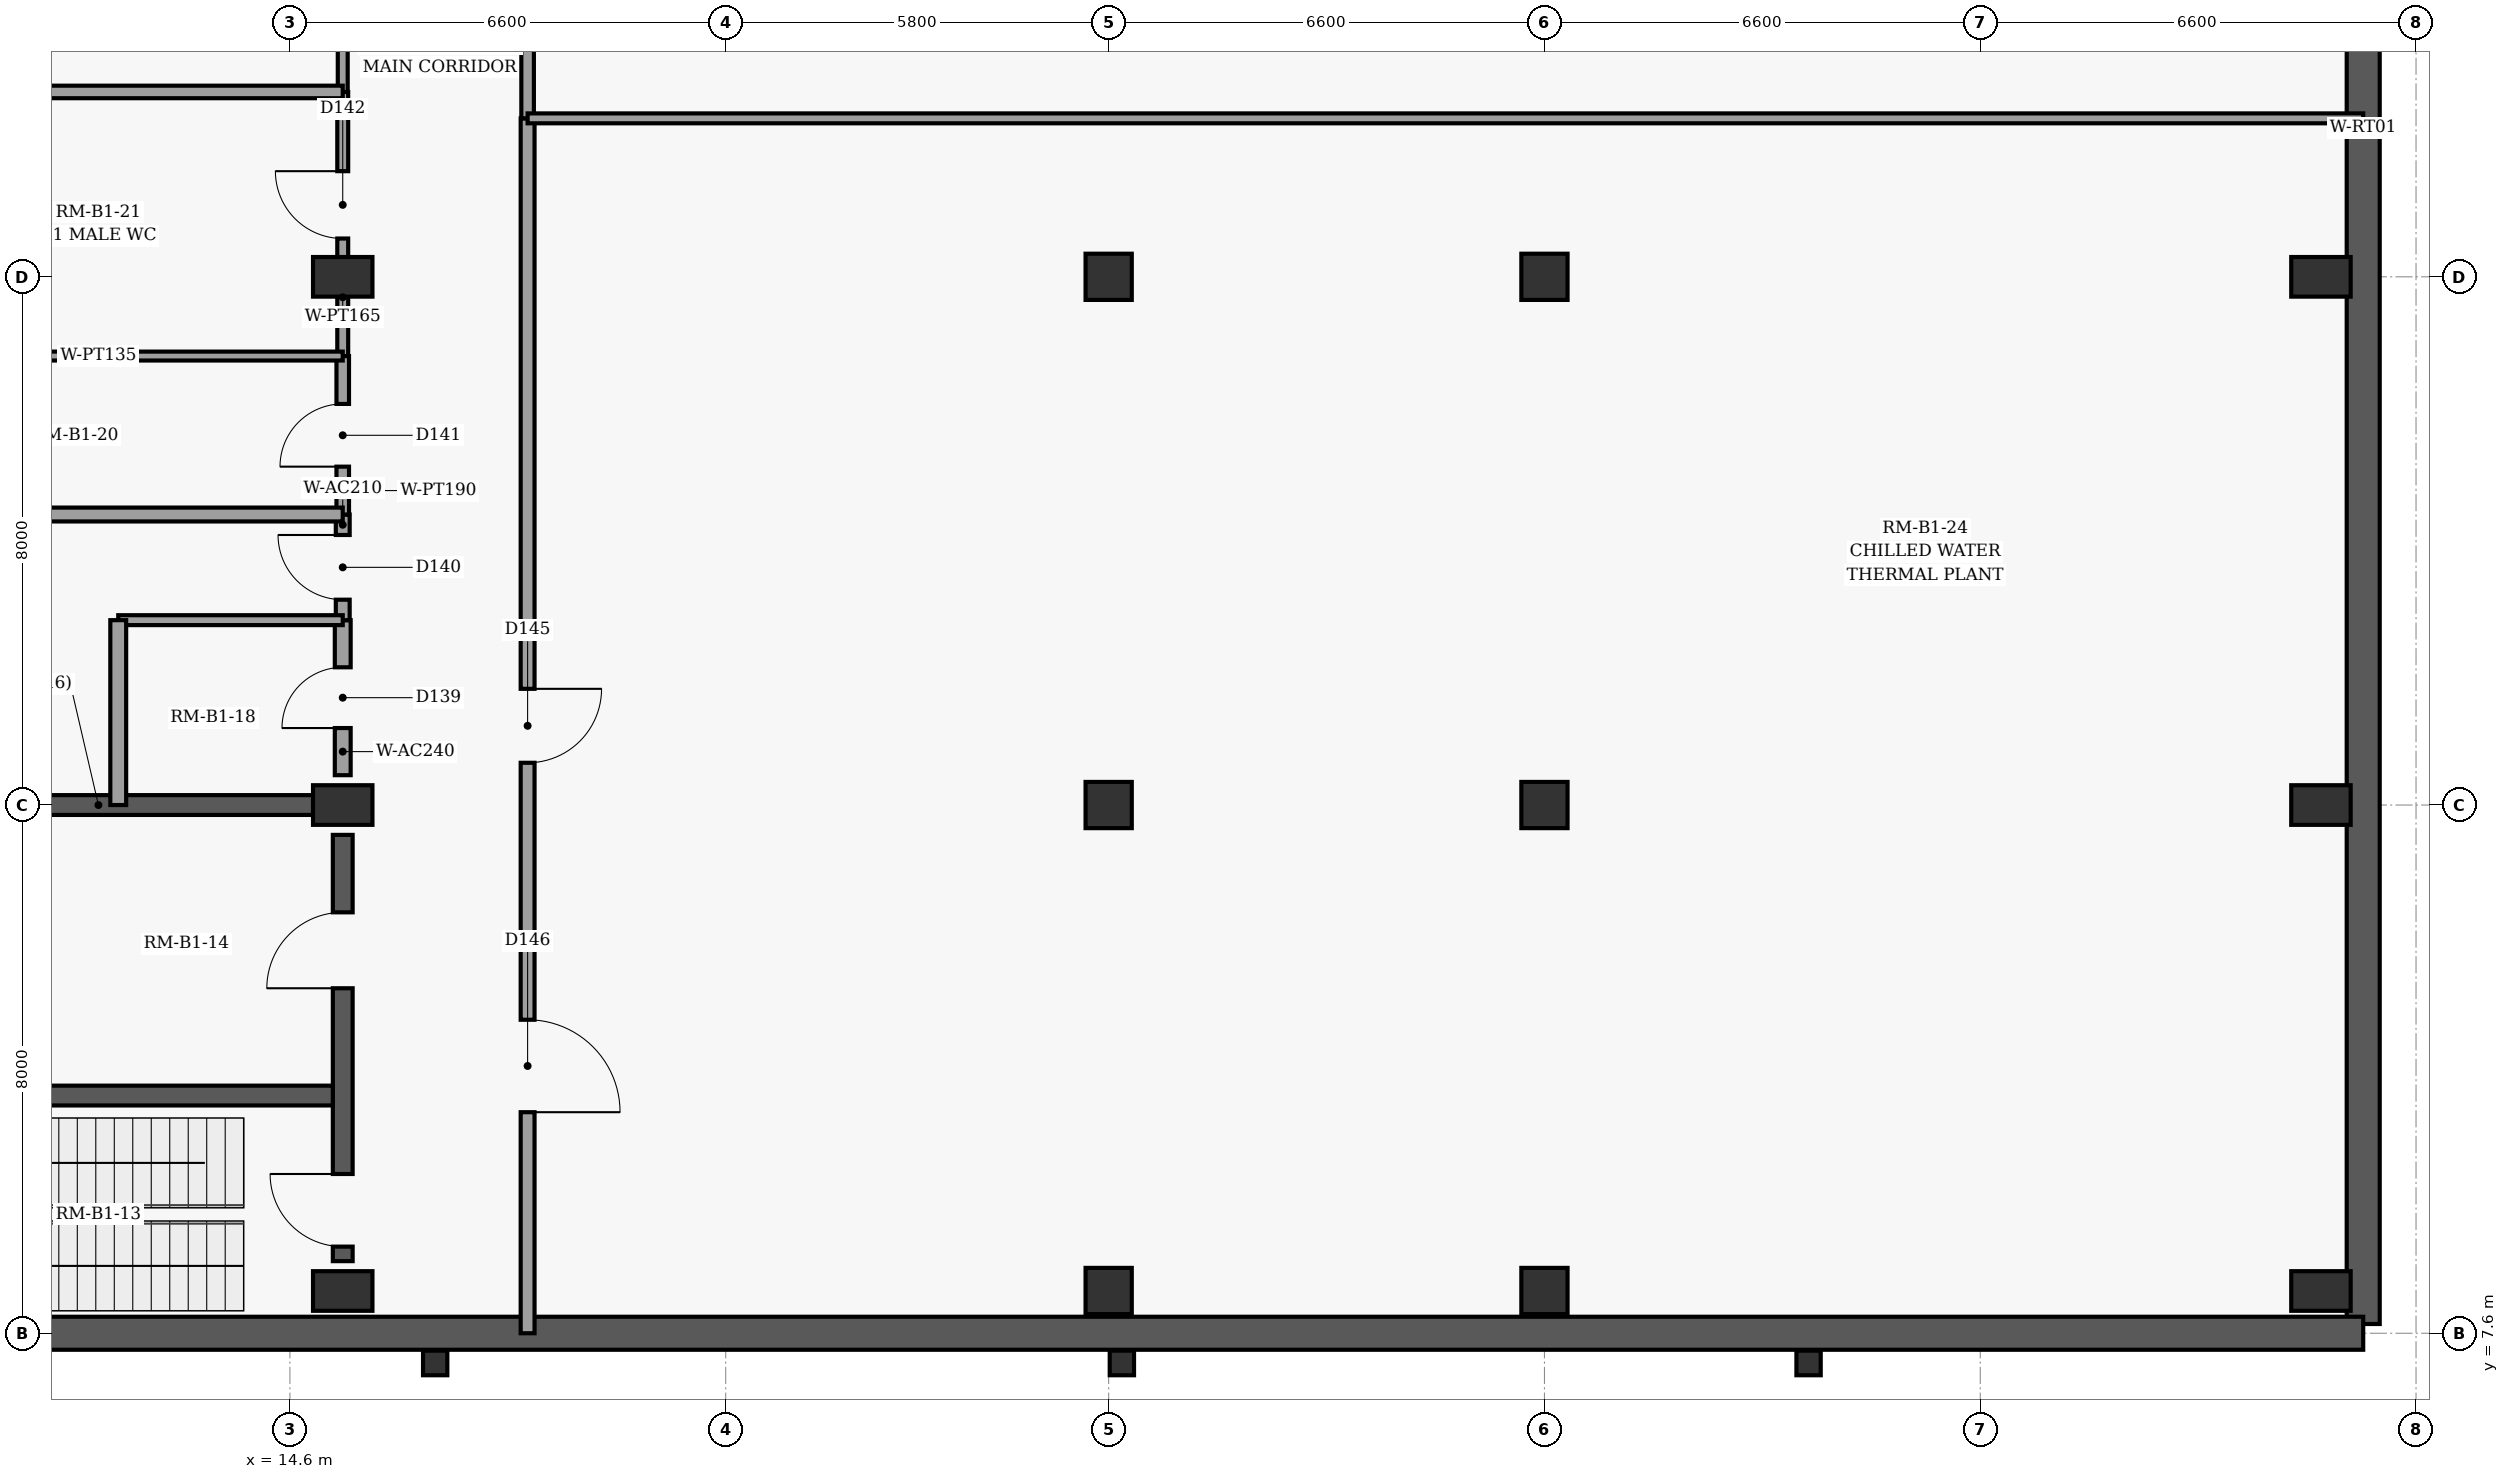
"""IFC4 building model, lengths in metres.
Left out: names, types, materials, properties, quantities, classifications, styles, units other than length and angle.
Written with IfcOpenShell. Run it as: python <this file> out.ifc"""

import sys

from ifc_helpers import new_model, si_unit, direction, frame, frame_2d, origin, origin_2d, place, context, subcontext, project, spatial, rectangle, i_section, extrude, element, fill, save


model = new_model("IFC4")
c1 = context("Model", 3, precision=1e-05, world=origin(), true_north=direction((0.0, 1.0)))
c2 = subcontext(c1, "Body", "Model", "MODEL_VIEW")
j1 = project(units=[si_unit("LENGTHUNIT", "METRE"), si_unit("PLANEANGLEUNIT", "RADIAN")], contexts=[c1])
p1 = place(None, origin())
s1 = spatial("IfcSite", under=j1, at=p1, CompositionType="ELEMENT")
p2 = place(p1, origin())
s2 = spatial("IfcBuilding", under=s1, at=p2, CompositionType="ELEMENT")
p3 = place(p2, frame((0.0, 0.0, -4.8)))
s3 = spatial("IfcBuildingStorey", under=s2, at=p3, CompositionType="ELEMENT", Elevation=-4.8)
for number, where, z_axis, x_axis in (
    (1, (15.4, 8.24, 0.0), (0.0, 0.0, 1.0), (1.0, 0.0, 0.0)),
    (2, (15.4, 15.6, 0.0), (0.0, 0.0, 1.0), (1.0, 0.0, 0.0)),
    (3, (15.4, 23.6, 0.0), (0.0, 0.0, 1.0), (1.0, 0.0, 0.0)),
):
    element("IfcColumn", number, at=place(p3, frame(where, z_axis=z_axis, x_axis=x_axis)), inside=s3, PredefinedType="COLUMN", context=c2, shape_type="SweptSolid", body=[
        extrude(rectangle(XDim=0.6, YDim=0.9, at=origin_2d()), origin(), (0.0, 0.0, 1.0), 4.8),
    ])
for number, where, z_axis, x_axis in (
    (4, (27.0, 8.24, 0.0), (0.0, 0.0, 1.0), (1.0, 0.0, 0.0)),
    (5, (27.0, 15.6, 0.0), (0.0, 0.0, 1.0), (1.0, 0.0, 0.0)),
    (6, (27.0, 23.6, 0.0), (0.0, 0.0, 1.0), (1.0, 0.0, 0.0)),
    (7, (33.6, 8.24, 0.0), (0.0, 0.0, 1.0), (1.0, 0.0, 0.0)),
    (8, (33.6, 15.6, 0.0), (0.0, 0.0, 1.0), (1.0, 0.0, 0.0)),
    (9, (33.6, 23.6, 0.0), (0.0, 0.0, 1.0), (1.0, 0.0, 0.0)),
):
    element("IfcColumn", number, at=place(p3, frame(where, z_axis=z_axis, x_axis=x_axis)), inside=s3, PredefinedType="COLUMN", context=c2, shape_type="SweptSolid", body=[
        extrude(rectangle(XDim=0.7, YDim=0.7, at=origin_2d()), origin(), (0.0, 0.0, 1.0), 4.8),
    ])
for number, where, z_axis, x_axis in (
    (10, (45.36, 8.24, 0.0), (0.0, 0.0, 1.0), (1.0, 0.0, 0.0)),
    (11, (45.36, 15.6, 0.0), (0.0, 0.0, 1.0), (1.0, 0.0, 0.0)),
    (12, (45.36, 23.6, 0.0), (0.0, 0.0, 1.0), (1.0, 0.0, 0.0)),
):
    element("IfcColumn", number, at=place(p3, frame(where, z_axis=z_axis, x_axis=x_axis)), inside=s3, PredefinedType="COLUMN", context=c2, shape_type="SweptSolid", body=[
        extrude(rectangle(XDim=0.6, YDim=0.9, at=origin_2d()), origin(), (0.0, 0.0, 1.0), 4.8),
    ])
for number, where, z_axis, x_axis in (
    (13, (16.8, 7.15, -0.45), (0.0, 0.0, 1.0), (1.0, 0.0, 0.0)),
    (14, (27.2, 7.15, -0.45), (0.0, 0.0, 1.0), (1.0, 0.0, 0.0)),
    (15, (37.6, 7.15, -0.45), (0.0, 0.0, 1.0), (1.0, 0.0, 0.0)),
):
    element("IfcColumn", number, at=place(p3, frame(where, z_axis=z_axis, x_axis=x_axis)), inside=s3, PredefinedType="COLUMN", context=c2, shape_type="SweptSolid", body=[
        extrude(i_section(OverallWidth=0.373, OverallDepth=0.368, WebThickness=0.014, FlangeThickness=0.024, at=origin_2d()), origin(), (0.0, 0.0, 1.0), 5.25),
    ])
p4 = place(p3, frame((46.0, 63.46, 0.0), z_axis=(0.0, 0.0, 1.0), x_axis=(0.0, -1.0, 0.0)))
e16 = element("IfcWall", 16, at=p4, inside=s3, PredefinedType="USERDEFINED", context=c2, shape_type="SweptSolid", body=[
    extrude(rectangle(XDim=55.72, YDim=0.5, at=frame_2d((27.86, 0.0))), origin(), (0.0, 0.0, 1.0), 4.5),
])
p5 = place(p3, frame((46.0, 7.6, 0.0), z_axis=(0.0, 0.0, 1.0), x_axis=(-1.0, 0.0, 0.0)))
e17 = element("IfcWall", 17, at=p5, inside=s3, PredefinedType="USERDEFINED", context=c2, shape_type="SweptSolid", body=[
    extrude(rectangle(XDim=38.0, YDim=0.5, at=frame_2d((19.0, 0.0))), origin(), (0.0, 0.0, 1.0), 4.5),
])
p6 = place(p3, frame((7.85, 15.6, 0.0), z_axis=(0.0, 0.0, 1.0), x_axis=(1.0, 0.0, 0.0)))
e18 = element("IfcWall", 18, at=p6, inside=s3, PredefinedType="SHEAR", context=c2, shape_type="SweptSolid", body=[
    extrude(rectangle(XDim=7.248, YDim=0.3, at=frame_2d((3.624, 0.0))), origin(), (0.0, 0.0, 1.0), 4.5),
])
p7 = place(p3, frame((15.4, 8.692, 0.0), z_axis=(0.0, 0.0, 1.0), x_axis=(0.0, 1.0, 0.0)))
e19 = element("IfcWall", 19, at=p7, inside=s3, PredefinedType="SHEAR", context=c2, shape_type="SweptSolid", body=[
    extrude(rectangle(XDim=6.456, YDim=0.3, at=frame_2d((3.228, 0.0))), origin(), (0.0, 0.0, 1.0), 4.5),
])
p8 = place(p7, frame((0.22, 0.0, 0.0)))
e20 = element("IfcOpeningElement", 20, at=p8, cuts=e19, PredefinedType="OPENING", context=c2, shape_type="SweptSolid", body=[
    extrude(rectangle(XDim=1.1, YDim=2.15, at=frame_2d((0.55, 1.075))), frame((0.0, 0.16, 0.0), z_axis=(0.0, -1.0, 0.0), x_axis=(1.0, 0.0, 0.0)), (0.0, 0.0, 1.0), 0.32),
])
p9 = place(p7, frame((4.133, 0.0, 0.0)))
e21 = element("IfcOpeningElement", 21, at=p9, cuts=e19, PredefinedType="OPENING", context=c2, shape_type="SweptSolid", body=[
    extrude(rectangle(XDim=1.15, YDim=2.2, at=frame_2d((0.575, 1.1))), frame((0.0, 0.16, 0.0), z_axis=(0.0, -1.0, 0.0), x_axis=(1.0, 0.0, 0.0)), (0.0, 0.0, 1.0), 0.32),
])
p10 = place(p3, frame((8.15, 11.2, 0.0), z_axis=(0.0, 0.0, 1.0), x_axis=(1.0, 0.0, 0.0)))
e22 = element("IfcWall", 22, at=p10, inside=s3, PredefinedType="SHEAR", context=c2, shape_type="SweptSolid", body=[
    extrude(rectangle(XDim=7.1, YDim=0.3, at=frame_2d((3.55, 0.0))), origin(), (0.0, 0.0, 1.0), 4.5),
])
p11 = place(p3, frame((15.4, 16.052, 0.0), z_axis=(0.0, 0.0, 1.0), x_axis=(0.0, 1.0, 0.0)))
e23 = element("IfcWall", 23, at=p11, inside=s3, PredefinedType="PARTITIONING", context=c2, shape_type="SweptSolid", body=[
    extrude(rectangle(XDim=2.348, YDim=0.24, at=frame_2d((1.174, 0.0))), origin(), (0.0, 0.0, 1.0), 3.65),
])
p12 = place(p11, frame((0.714, 0.0, 0.0)))
e24 = element("IfcOpeningElement", 24, at=p12, cuts=e23, PredefinedType="OPENING", context=c2, shape_type="SweptSolid", body=[
    extrude(rectangle(XDim=0.92, YDim=2.1, at=frame_2d((0.46, 1.05))), frame((0.0, 0.13, 0.0), z_axis=(0.0, -1.0, 0.0), x_axis=(1.0, 0.0, 0.0)), (0.0, 0.0, 1.0), 0.26),
])
p13 = place(p3, frame((15.4, 18.4, 0.0), z_axis=(0.0, 0.0, 1.0), x_axis=(0.0, 1.0, 0.0)))
e25 = element("IfcWall", 25, at=p13, inside=s3, PredefinedType="PARTITIONING", context=c2, shape_type="SweptSolid", body=[
    extrude(rectangle(XDim=1.6, YDim=0.21, at=frame_2d((0.8, 0.0))), origin(), (0.0, 0.0, 1.0), 3.65),
])
p14 = place(p13, frame((0.31, 0.0, 0.0)))
e26 = element("IfcOpeningElement", 26, at=p14, cuts=e25, PredefinedType="OPENING", context=c2, shape_type="SweptSolid", body=[
    extrude(rectangle(XDim=0.98, YDim=2.1, at=frame_2d((0.49, 1.05))), frame((0.0, 0.115, 0.0), z_axis=(0.0, -1.0, 0.0), x_axis=(1.0, 0.0, 0.0)), (0.0, 0.0, 1.0), 0.23),
])
p15 = place(p3, frame((15.4, 20.0, 0.0), z_axis=(0.0, 0.0, 1.0), x_axis=(0.0, 1.0, 0.0)))
e27 = element("IfcWall", 27, at=p15, inside=s3, PredefinedType="PARTITIONING", context=c2, shape_type="SweptSolid", body=[
    extrude(rectangle(XDim=2.4, YDim=0.19, at=frame_2d((1.2, 0.0))), origin(), (0.0, 0.0, 1.0), 3.65),
])
p16 = place(p15, frame((0.725, 0.0, 0.0)))
e28 = element("IfcOpeningElement", 28, at=p16, cuts=e27, PredefinedType="OPENING", context=c2, shape_type="SweptSolid", body=[
    extrude(rectangle(XDim=0.95, YDim=2.1, at=frame_2d((0.475, 1.05))), frame((0.0, 0.105, 0.0), z_axis=(0.0, -1.0, 0.0), x_axis=(1.0, 0.0, 0.0)), (0.0, 0.0, 1.0), 0.21),
])
p17 = place(p3, frame((15.4, 22.4, 0.0), z_axis=(0.0, 0.0, 1.0), x_axis=(0.0, 1.0, 0.0)))
e29 = element("IfcWall", 29, at=p17, inside=s3, PredefinedType="PARTITIONING", context=c2, shape_type="SweptSolid", body=[
    extrude(rectangle(XDim=4.0, YDim=0.165, at=frame_2d((2.0, 0.0))), origin(), (0.0, 0.0, 1.0), 3.65),
])
p18 = place(p17, frame((1.78, 0.0, 0.0)))
e30 = element("IfcOpeningElement", 30, at=p18, cuts=e29, PredefinedType="OPENING", context=c2, shape_type="SweptSolid", body=[
    extrude(rectangle(XDim=1.02, YDim=2.1, at=frame_2d((0.51, 1.05))), frame((0.0, 0.093, 0.0), z_axis=(0.0, -1.0, 0.0), x_axis=(1.0, 0.0, 0.0)), (0.0, 0.0, 1.0), 0.185),
])
p19 = place(p3, frame((15.4, 26.4, 0.0), z_axis=(0.0, 0.0, 1.0), x_axis=(0.0, 1.0, 0.0)))
e31 = element("IfcWall", 31, at=p19, inside=s3, PredefinedType="PARTITIONING", context=c2, shape_type="SweptSolid", body=[
    extrude(rectangle(XDim=17.6, YDim=0.15, at=frame_2d((8.8, 0.0))), origin(), (0.0, 0.0, 1.0), 3.65),
])
p20 = place(p19, frame((8.3, 0.0, 0.0)))
e32 = element("IfcOpeningElement", 32, at=p20, cuts=e31, PredefinedType="OPENING", context=c2, shape_type="SweptSolid", body=[
    extrude(rectangle(XDim=1.0, YDim=2.1, at=frame_2d((0.5, 1.05))), frame((0.0, 0.085, 0.0), z_axis=(0.0, -1.0, 0.0), x_axis=(1.0, 0.0, 0.0)), (0.0, 0.0, 1.0), 0.17),
])
p21 = place(p3, frame((18.2, 26.0, 0.0), z_axis=(0.0, 0.0, 1.0), x_axis=(0.0, -1.0, 0.0)))
e33 = element("IfcWall", 33, at=p21, inside=s3, PredefinedType="PARTITIONING", context=c2, shape_type="SweptSolid", body=[
    extrude(rectangle(XDim=18.4, YDim=0.21, at=frame_2d((9.2, 0.0))), origin(), (0.0, 0.0, 1.0), 4.5),
])
p22 = place(p21, frame((8.64, 0.0, 0.0)))
e34 = element("IfcOpeningElement", 34, at=p22, cuts=e33, PredefinedType="OPENING", context=c2, shape_type="SweptSolid", body=[
    extrude(rectangle(XDim=1.12, YDim=2.15, at=frame_2d((0.56, 1.075))), frame((0.0, 0.115, 0.0), z_axis=(0.0, -1.0, 0.0), x_axis=(1.0, 0.0, 0.0)), (0.0, 0.0, 1.0), 0.23),
])
p23 = place(p21, frame((13.652, 0.0, 0.0)))
e35 = element("IfcOpeningElement", 35, at=p23, cuts=e33, PredefinedType="OPENING", context=c2, shape_type="SweptSolid", body=[
    extrude(rectangle(XDim=1.4, YDim=2.25, at=frame_2d((0.7, 1.125))), frame((0.0, 0.115, 0.0), z_axis=(0.0, -1.0, 0.0), x_axis=(1.0, 0.0, 0.0)), (0.0, 0.0, 1.0), 0.23),
])
p24 = place(p3, frame((18.2, 44.8, 0.0), z_axis=(0.0, 0.0, 1.0), x_axis=(0.0, -1.0, 0.0)))
e36 = element("IfcWall", 36, at=p24, inside=s3, PredefinedType="PARTITIONING", context=c2, shape_type="SweptSolid", body=[
    extrude(rectangle(XDim=18.8, YDim=0.19, at=frame_2d((9.4, 0.0))), origin(), (0.0, 0.0, 1.0), 4.5),
])
p25 = place(p24, frame((8.81, 0.0, 0.0)))
e37 = element("IfcOpeningElement", 37, at=p25, cuts=e36, PredefinedType="OPENING", context=c2, shape_type="SweptSolid", body=[
    extrude(rectangle(XDim=1.18, YDim=2.15, at=frame_2d((0.59, 1.075))), frame((0.0, 0.105, 0.0), z_axis=(0.0, -1.0, 0.0), x_axis=(1.0, 0.0, 0.0)), (0.0, 0.0, 1.0), 0.21),
])
p26 = place(p24, frame((13.964, 0.0, 0.0)))
e38 = element("IfcOpeningElement", 38, at=p26, cuts=e36, PredefinedType="OPENING", context=c2, shape_type="SweptSolid", body=[
    extrude(rectangle(XDim=1.4, YDim=2.25, at=frame_2d((0.7, 1.125))), frame((0.0, 0.105, 0.0), z_axis=(0.0, -1.0, 0.0), x_axis=(1.0, 0.0, 0.0)), (0.0, 0.0, 1.0), 0.21),
])
p27 = place(p3, frame((12.0, 18.4, 0.0), z_axis=(0.0, 0.0, 1.0), x_axis=(1.0, 0.0, 0.0)))
e39 = element("IfcWall", 39, at=p27, inside=s3, PredefinedType="PARTITIONING", context=c2, shape_type="SweptSolid", body=[
    extrude(rectangle(XDim=3.4, YDim=0.15, at=frame_2d((1.7, 0.0))), origin(), (0.0, 0.0, 1.0), 4.5),
])
p28 = place(p3, frame((12.0, 15.6, 0.0), z_axis=(0.0, 0.0, 1.0), x_axis=(0.0, 1.0, 0.0)))
e40 = element("IfcWall", 40, at=p28, inside=s3, PredefinedType="PARTITIONING", context=c2, shape_type="SweptSolid", body=[
    extrude(rectangle(XDim=2.8, YDim=0.24, at=frame_2d((1.4, 0.0))), origin(), (0.0, 0.0, 1.0), 4.5),
])
p29 = place(p3, frame((8.0, 20.0, 0.0), z_axis=(0.0, 0.0, 1.0), x_axis=(1.0, 0.0, 0.0)))
e41 = element("IfcWall", 41, at=p29, inside=s3, PredefinedType="PARTITIONING", context=c2, shape_type="SweptSolid", body=[
    extrude(rectangle(XDim=7.4, YDim=0.21, at=frame_2d((3.7, 0.0))), origin(), (0.0, 0.0, 1.0), 4.5),
])
p30 = place(p3, frame((8.0, 22.4, 0.0), z_axis=(0.0, 0.0, 1.0), x_axis=(1.0, 0.0, 0.0)))
e42 = element("IfcWall", 42, at=p30, inside=s3, PredefinedType="PARTITIONING", context=c2, shape_type="SweptSolid", body=[
    extrude(rectangle(XDim=7.4, YDim=0.135, at=frame_2d((3.7, 0.0))), origin(), (0.0, 0.0, 1.0), 4.5),
])
p31 = place(p3, frame((8.0, 26.4, 0.0), z_axis=(0.0, 0.0, 1.0), x_axis=(1.0, 0.0, 0.0)))
e43 = element("IfcWall", 43, at=p31, inside=s3, PredefinedType="PARTITIONING", context=c2, shape_type="SweptSolid", body=[
    extrude(rectangle(XDim=7.4, YDim=0.19, at=frame_2d((3.7, 0.0))), origin(), (0.0, 0.0, 1.0), 4.5),
])
p32 = place(p3, frame((18.2, 26.0, 0.0), z_axis=(0.0, 0.0, 1.0), x_axis=(1.0, 0.0, 0.0)))
e44 = element("IfcWall", 44, at=p32, inside=s3, PredefinedType="PARTITIONING", context=c2, shape_type="SweptSolid", body=[
    extrude(rectangle(XDim=27.8, YDim=0.15, at=frame_2d((13.9, 0.0))), origin(), (0.0, 0.0, 1.0), 4.5),
])
p33 = place(p8, origin())
e45 = element("IfcDoor", 45, at=p33, inside=s3, OperationType="SINGLE_SWING_RIGHT", PredefinedType="DOOR", context=c2, shape_type="SweptSolid", body=[
    extrude(rectangle(XDim=1.1, YDim=2.15, at=frame_2d((0.55, 1.075))), frame((0.0, 0.025, 0.0), z_axis=(0.0, -1.0, 0.0), x_axis=(1.0, 0.0, 0.0)), (0.0, 0.0, 1.0), 0.05),
])
fill(e20, e45)
p34 = place(p9, origin())
e46 = element("IfcDoor", 46, at=p34, inside=s3, OperationType="SINGLE_SWING_LEFT", PredefinedType="DOOR", context=c2, shape_type="SweptSolid", body=[
    extrude(rectangle(XDim=1.15, YDim=2.2, at=frame_2d((0.575, 1.1))), frame((0.0, 0.025, 0.0), z_axis=(0.0, -1.0, 0.0), x_axis=(1.0, 0.0, 0.0)), (0.0, 0.0, 1.0), 0.05),
])
fill(e21, e46)
p35 = place(p12, origin())
e47 = element("IfcDoor", 47, at=p35, inside=s3, OperationType="SINGLE_SWING_LEFT", PredefinedType="DOOR", context=c2, shape_type="SweptSolid", body=[
    extrude(rectangle(XDim=0.92, YDim=2.1, at=frame_2d((0.46, 1.05))), frame((0.0, 0.025, 0.0), z_axis=(0.0, -1.0, 0.0), x_axis=(1.0, 0.0, 0.0)), (0.0, 0.0, 1.0), 0.05),
])
fill(e24, e47)
p36 = place(p14, origin())
e48 = element("IfcDoor", 48, at=p36, inside=s3, OperationType="SINGLE_SWING_RIGHT", PredefinedType="DOOR", context=c2, shape_type="SweptSolid", body=[
    extrude(rectangle(XDim=0.98, YDim=2.1, at=frame_2d((0.49, 1.05))), frame((0.0, 0.025, 0.0), z_axis=(0.0, -1.0, 0.0), x_axis=(1.0, 0.0, 0.0)), (0.0, 0.0, 1.0), 0.05),
])
fill(e26, e48)
p37 = place(p16, origin())
e49 = element("IfcDoor", 49, at=p37, inside=s3, OperationType="SINGLE_SWING_LEFT", PredefinedType="DOOR", context=c2, shape_type="SweptSolid", body=[
    extrude(rectangle(XDim=0.95, YDim=2.1, at=frame_2d((0.475, 1.05))), frame((0.0, 0.025, 0.0), z_axis=(0.0, -1.0, 0.0), x_axis=(1.0, 0.0, 0.0)), (0.0, 0.0, 1.0), 0.05),
])
fill(e28, e49)
p38 = place(p18, origin())
e50 = element("IfcDoor", 50, at=p38, inside=s3, OperationType="SINGLE_SWING_RIGHT", PredefinedType="DOOR", context=c2, shape_type="SweptSolid", body=[
    extrude(rectangle(XDim=1.02, YDim=2.1, at=frame_2d((0.51, 1.05))), frame((0.0, 0.025, 0.0), z_axis=(0.0, -1.0, 0.0), x_axis=(1.0, 0.0, 0.0)), (0.0, 0.0, 1.0), 0.05),
])
fill(e30, e50)
p39 = place(p22, origin())
e51 = element("IfcDoor", 51, at=p39, inside=s3, OperationType="SINGLE_SWING_LEFT", PredefinedType="DOOR", context=c2, shape_type="SweptSolid", body=[
    extrude(rectangle(XDim=1.12, YDim=2.15, at=frame_2d((0.56, 1.075))), frame((0.0, 0.025, 0.0), z_axis=(0.0, -1.0, 0.0), x_axis=(1.0, 0.0, 0.0)), (0.0, 0.0, 1.0), 0.05),
])
fill(e34, e51)
p40 = place(p23, origin())
e52 = element("IfcDoor", 52, at=p40, inside=s3, OperationType="SINGLE_SWING_RIGHT", PredefinedType="DOOR", context=c2, shape_type="SweptSolid", body=[
    extrude(rectangle(XDim=1.4, YDim=2.25, at=frame_2d((0.7, 1.125))), frame((0.0, 0.025, 0.0), z_axis=(0.0, -1.0, 0.0), x_axis=(1.0, 0.0, 0.0)), (0.0, 0.0, 1.0), 0.05),
])
fill(e35, e52)
save(model, sys.argv[1])
